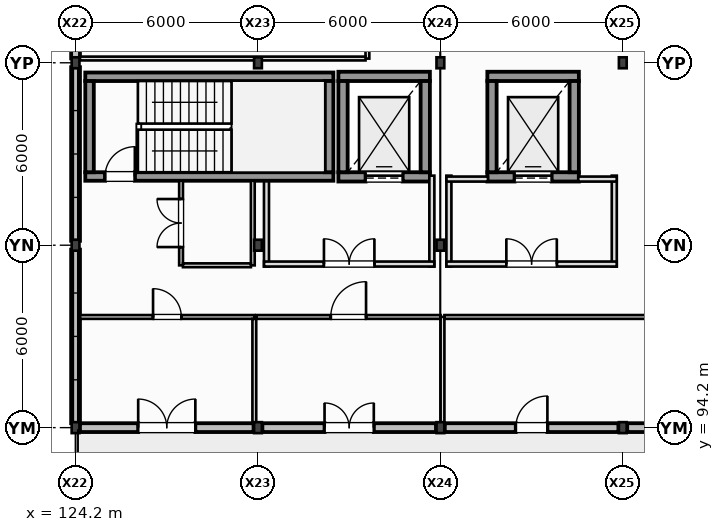
"""IFC4 building model, lengths in metres.
Left out: names, types, materials, properties, quantities, classifications, styles, units other than length and angle.
Written with IfcOpenShell. Run it as: python <this file> out.ifc"""

import sys

from ifc_helpers import new_model, si_unit, direction, frame, frame_2d, origin, origin_2d, place, context, subcontext, project, spatial, rectangle, i_section, extrude, element, fill, save


model = new_model("IFC4")
c1 = context("Model", 3, precision=1e-05, world=origin(), true_north=direction((0.0, 1.0)))
c2 = subcontext(c1, "Body", "Model", "MODEL_VIEW")
j1 = project(units=[si_unit("LENGTHUNIT", "METRE"), si_unit("PLANEANGLEUNIT", "RADIAN")], contexts=[c1])
p1 = place(None, origin())
s1 = spatial("IfcSite", under=j1, at=p1, CompositionType="ELEMENT")
p2 = place(p1, origin())
s2 = spatial("IfcBuilding", under=s1, at=p2, CompositionType="ELEMENT")
p3 = place(p2, frame((0.0, 0.0, 18.0)))
s3 = spatial("IfcBuildingStorey", under=s2, at=p3, CompositionType="ELEMENT", Elevation=18.0)
for number, where, z_axis, x_axis in (
    (1, (124.2, 94.2, 0.0), (0.0, 0.0, 1.0), (1.0, 0.0, 0.0)),
    (2, (124.2, 100.2, 0.0), (0.0, 0.0, 1.0), (1.0, 0.0, 0.0)),
    (3, (124.2, 106.2, 0.0), (0.0, 0.0, 1.0), (1.0, 0.0, 0.0)),
    (4, (130.2, 94.2, 0.0), (0.0, 0.0, 1.0), (1.0, 0.0, 0.0)),
    (5, (130.2, 100.2, 0.0), (0.0, 0.0, 1.0), (1.0, 0.0, 0.0)),
    (6, (130.2, 106.2, 0.0), (0.0, 0.0, 1.0), (1.0, 0.0, 0.0)),
    (7, (136.2, 94.2, 0.0), (0.0, 0.0, 1.0), (1.0, 0.0, 0.0)),
    (8, (136.2, 100.2, 0.0), (0.0, 0.0, 1.0), (1.0, 0.0, 0.0)),
    (9, (136.2, 106.2, 0.0), (0.0, 0.0, 1.0), (1.0, 0.0, 0.0)),
    (10, (142.2, 94.2, 0.0), (0.0, 0.0, 1.0), (1.0, 0.0, 0.0)),
    (11, (142.2, 106.2, 0.0), (0.0, 0.0, 1.0), (1.0, 0.0, 0.0)),
):
    element("IfcColumn", number, at=place(p3, frame(where, z_axis=z_axis, x_axis=x_axis)), inside=s3, PredefinedType="COLUMN", context=c2, shape_type="SweptSolid", body=[
        extrude(i_section(OverallWidth=0.256, OverallDepth=0.36, WebThickness=0.011, FlangeThickness=0.02, at=origin_2d()), origin(), (0.0, 0.0, 1.0), 3.6),
    ])
p4 = place(p3, frame((124.345, 94.2, 0.0), z_axis=(0.0, 0.0, 1.0), x_axis=(1.0, 0.0, 0.0)))
e12 = element("IfcWall", 12, at=p4, inside=s3, PredefinedType="STANDARD", context=c2, shape_type="SweptSolid", body=[
    extrude(rectangle(XDim=5.71, YDim=0.29, at=frame_2d((2.855, 0.0))), origin(), (0.0, 0.0, 1.0), 3.6),
])
p5 = place(p4, frame((1.915, 0.0, 0.0)))
e13 = element("IfcOpeningElement", 13, at=p5, cuts=e12, PredefinedType="OPENING", context=c2, shape_type="SweptSolid", body=[
    extrude(rectangle(XDim=1.88, YDim=2.28, at=frame_2d((0.94, 1.14))), frame((0.0, 0.155, 0.0), z_axis=(0.0, -1.0, 0.0), x_axis=(1.0, 0.0, 0.0)), (0.0, 0.0, 1.0), 0.31),
])
p6 = place(p3, frame((130.345, 94.2, 0.0), z_axis=(0.0, 0.0, 1.0), x_axis=(1.0, 0.0, 0.0)))
e14 = element("IfcWall", 14, at=p6, inside=s3, PredefinedType="STANDARD", context=c2, shape_type="SweptSolid", body=[
    extrude(rectangle(XDim=5.71, YDim=0.29, at=frame_2d((2.855, 0.0))), origin(), (0.0, 0.0, 1.0), 3.6),
])
p7 = place(p6, frame((2.045, 0.0, 0.0)))
e15 = element("IfcOpeningElement", 15, at=p7, cuts=e14, PredefinedType="OPENING", context=c2, shape_type="SweptSolid", body=[
    extrude(rectangle(XDim=1.62, YDim=2.2, at=frame_2d((0.81, 1.1))), frame((0.0, 0.155, 0.0), z_axis=(0.0, -1.0, 0.0), x_axis=(1.0, 0.0, 0.0)), (0.0, 0.0, 1.0), 0.31),
])
p8 = place(p3, frame((136.345, 94.2, 0.0), z_axis=(0.0, 0.0, 1.0), x_axis=(1.0, 0.0, 0.0)))
e16 = element("IfcWall", 16, at=p8, inside=s3, PredefinedType="STANDARD", context=c2, shape_type="SweptSolid", body=[
    extrude(rectangle(XDim=5.71, YDim=0.29, at=frame_2d((2.855, 0.0))), origin(), (0.0, 0.0, 1.0), 3.6),
])
p9 = place(p8, frame((2.335, 0.0, 0.0)))
e17 = element("IfcOpeningElement", 17, at=p9, cuts=e16, PredefinedType="OPENING", context=c2, shape_type="SweptSolid", body=[
    extrude(rectangle(XDim=1.04, YDim=2.16, at=frame_2d((0.52, 1.08))), frame((0.0, 0.155, 0.0), z_axis=(0.0, -1.0, 0.0), x_axis=(1.0, 0.0, 0.0)), (0.0, 0.0, 1.0), 0.31),
])
p10 = place(p3, frame((142.345, 94.2, 0.0), z_axis=(0.0, 0.0, 1.0), x_axis=(1.0, 0.0, 0.0)))
e18 = element("IfcWall", 18, at=p10, inside=s3, PredefinedType="STANDARD", context=c2, shape_type="SweptSolid", body=[
    extrude(rectangle(XDim=5.71, YDim=0.29, at=frame_2d((2.855, 0.0))), origin(), (0.0, 0.0, 1.0), 3.219),
])
p11 = place(p10, frame((2.375, 0.0, 0.0)))
e19 = element("IfcOpeningElement", 19, at=p11, cuts=e18, PredefinedType="OPENING", context=c2, shape_type="SweptSolid", body=[
    extrude(rectangle(XDim=0.96, YDim=2.14, at=frame_2d((0.48, 1.07))), frame((0.0, 0.155, 0.0), z_axis=(0.0, -1.0, 0.0), x_axis=(1.0, 0.0, 0.0)), (0.0, 0.0, 1.0), 0.31),
])
p12 = place(p3, frame((124.2, 100.055, 0.0), z_axis=(0.0, 0.0, 1.0), x_axis=(0.0, -1.0, 0.0)))
e20 = element("IfcWall", 20, at=p12, inside=s3, PredefinedType="STANDARD", context=c2, shape_type="SweptSolid", body=[
    extrude(rectangle(XDim=5.71, YDim=0.29, at=frame_2d((2.855, 0.0))), origin(), (0.0, 0.0, 1.0), 0.92),
])
p13 = place(p3, frame((124.2, 106.055, 0.0), z_axis=(0.0, 0.0, 1.0), x_axis=(0.0, -1.0, 0.0)))
e21 = element("IfcWall", 21, at=p13, inside=s3, PredefinedType="STANDARD", context=c2, shape_type="SweptSolid", body=[
    extrude(rectangle(XDim=5.71, YDim=0.29, at=frame_2d((2.855, 0.0))), origin(), (0.0, 0.0, 1.0), 0.32),
])
p14 = place(p3, frame((124.2, 112.055, 0.0), z_axis=(0.0, 0.0, 1.0), x_axis=(0.0, -1.0, 0.0)))
e22 = element("IfcWall", 22, at=p14, inside=s3, PredefinedType="STANDARD", context=c2, shape_type="SweptSolid", body=[
    extrude(rectangle(XDim=5.71, YDim=0.29, at=frame_2d((2.855, 0.0))), origin(), (0.0, 0.0, 1.0), 3.6),
])
p15 = place(p14, frame((1.83, 0.0, 0.85)))
e23 = element("IfcOpeningElement", 23, at=p15, cuts=e22, PredefinedType="OPENING", context=c2, shape_type="SweptSolid", body=[
    extrude(rectangle(XDim=2.05, YDim=1.75, at=frame_2d((1.025, 0.875))), frame((0.0, 0.155, 0.0), z_axis=(0.0, -1.0, 0.0), x_axis=(1.0, 0.0, 0.0)), (0.0, 0.0, 1.0), 0.31),
])
p16 = place(p3, frame((124.52, 102.46, 0.0), z_axis=(0.0, 0.0, 1.0), x_axis=(1.0, 0.0, 0.0)))
e24 = element("IfcWall", 24, at=p16, inside=s3, PredefinedType="SHEAR", context=c2, shape_type="SweptSolid", body=[
    extrude(rectangle(XDim=8.16, YDim=0.28, at=frame_2d((4.08, 0.0))), origin(), (0.0, 0.0, 1.0), 3.45),
])
p17 = place(p16, frame((0.65, 0.0, 0.0)))
e25 = element("IfcOpeningElement", 25, at=p17, cuts=e24, PredefinedType="OPENING", context=c2, shape_type="SweptSolid", body=[
    extrude(rectangle(XDim=0.98, YDim=2.15, at=frame_2d((0.49, 1.075))), frame((0.0, 0.15, 0.0), z_axis=(0.0, -1.0, 0.0), x_axis=(1.0, 0.0, 0.0)), (0.0, 0.0, 1.0), 0.3),
])
p18 = place(p3, frame((132.68, 105.74, 0.0), z_axis=(0.0, 0.0, 1.0), x_axis=(-1.0, 0.0, 0.0)))
e26 = element("IfcWall", 26, at=p18, inside=s3, PredefinedType="SHEAR", context=c2, shape_type="SweptSolid", body=[
    extrude(rectangle(XDim=8.16, YDim=0.28, at=frame_2d((4.08, 0.0))), origin(), (0.0, 0.0, 1.0), 3.45),
])
for number, where, z_axis, x_axis in (
    (27, (124.66, 105.6, 0.0), (0.0, 0.0, 1.0), (0.0, -1.0, 0.0)),
    (28, (132.54, 102.6, 0.0), (0.0, 0.0, 1.0), (0.0, 1.0, 0.0)),
):
    element("IfcWall", number, at=place(p3, frame(where, z_axis=z_axis, x_axis=x_axis)), inside=s3, PredefinedType="SHEAR", context=c2, shape_type="SweptSolid", body=[
        extrude(rectangle(XDim=3.0, YDim=0.28, at=frame_2d((1.5, 0.0))), origin(), (0.0, 0.0, 1.0), 3.45),
    ])
p19 = place(p3, frame((132.845, 102.448, 0.0), z_axis=(0.0, 0.0, 1.0), x_axis=(1.0, 0.0, 0.0)))
e29 = element("IfcWall", 29, at=p19, inside=s3, PredefinedType="SHEAR", context=c2, shape_type="SweptSolid", body=[
    extrude(rectangle(XDim=3.01, YDim=0.305, at=frame_2d((1.505, 0.0))), origin(), (0.0, 0.0, 1.0), 3.45),
])
p20 = place(p19, frame((0.895, 0.0, 0.0)))
e30 = element("IfcOpeningElement", 30, at=p20, cuts=e29, PredefinedType="OPENING", context=c2, shape_type="SweptSolid", body=[
    extrude(rectangle(XDim=1.22, YDim=2.22, at=frame_2d((0.61, 1.11))), frame((0.0, 0.162, 0.0), z_axis=(0.0, -1.0, 0.0), x_axis=(1.0, 0.0, 0.0)), (0.0, 0.0, 1.0), 0.325),
])
p21 = place(p3, frame((135.855, 105.752, 0.0), z_axis=(0.0, 0.0, 1.0), x_axis=(-1.0, 0.0, 0.0)))
e31 = element("IfcWall", 31, at=p21, inside=s3, PredefinedType="SHEAR", context=c2, shape_type="SweptSolid", body=[
    extrude(rectangle(XDim=3.01, YDim=0.305, at=frame_2d((1.505, 0.0))), origin(), (0.0, 0.0, 1.0), 3.45),
])
for number, where, z_axis, x_axis in (
    (32, (132.998, 105.6, 0.0), (0.0, 0.0, 1.0), (0.0, -1.0, 0.0)),
    (33, (135.702, 102.6, 0.0), (0.0, 0.0, 1.0), (0.0, 1.0, 0.0)),
):
    element("IfcWall", number, at=place(p3, frame(where, z_axis=z_axis, x_axis=x_axis)), inside=s3, PredefinedType="SHEAR", context=c2, shape_type="SweptSolid", body=[
        extrude(rectangle(XDim=3.0, YDim=0.305, at=frame_2d((1.5, 0.0))), origin(), (0.0, 0.0, 1.0), 3.45),
    ])
for number, where, z_axis, x_axis in (
    (34, (130.48, 99.5, 0.0), (0.0, 0.0, 1.0), (0.0, 1.0, 0.0)),
    (35, (135.92, 102.488, 0.0), (0.0, 0.0, 1.0), (0.0, -1.0, 0.0)),
):
    element("IfcWall", number, at=place(p3, frame(where, z_axis=z_axis, x_axis=x_axis)), inside=s3, PredefinedType="PARTITIONING", context=c2, shape_type="SweptSolid", body=[
        extrude(rectangle(XDim=2.988, YDim=0.165, at=frame_2d((1.494, 0.0))), origin(), (0.0, 0.0, 1.0), 3.36),
    ])
p22 = place(p3, frame((130.4, 99.58, 0.0), z_axis=(0.0, 0.0, 1.0), x_axis=(1.0, 0.0, 0.0)))
e36 = element("IfcWall", 36, at=p22, inside=s3, PredefinedType="PARTITIONING", context=c2, shape_type="SweptSolid", body=[
    extrude(rectangle(XDim=5.6, YDim=0.165, at=frame_2d((2.8, 0.0))), origin(), (0.0, 0.0, 1.0), 3.36),
])
p23 = place(p22, frame((1.97, 0.0, 0.0)))
e37 = element("IfcOpeningElement", 37, at=p23, cuts=e36, PredefinedType="OPENING", context=c2, shape_type="SweptSolid", body=[
    extrude(rectangle(XDim=1.66, YDim=2.2, at=frame_2d((0.83, 1.1))), frame((0.0, 0.093, 0.0), z_axis=(0.0, -1.0, 0.0), x_axis=(1.0, 0.0, 0.0)), (0.0, 0.0, 1.0), 0.185),
])
p24 = place(p3, frame((137.745, 102.448, 0.0), z_axis=(0.0, 0.0, 1.0), x_axis=(1.0, 0.0, 0.0)))
e38 = element("IfcWall", 38, at=p24, inside=s3, PredefinedType="SHEAR", context=c2, shape_type="SweptSolid", body=[
    extrude(rectangle(XDim=3.01, YDim=0.305, at=frame_2d((1.505, 0.0))), origin(), (0.0, 0.0, 1.0), 3.45),
])
p25 = place(p24, frame((0.895, 0.0, 0.0)))
e39 = element("IfcOpeningElement", 39, at=p25, cuts=e38, PredefinedType="OPENING", context=c2, shape_type="SweptSolid", body=[
    extrude(rectangle(XDim=1.22, YDim=2.22, at=frame_2d((0.61, 1.11))), frame((0.0, 0.162, 0.0), z_axis=(0.0, -1.0, 0.0), x_axis=(1.0, 0.0, 0.0)), (0.0, 0.0, 1.0), 0.325),
])
p26 = place(p3, frame((140.755, 105.752, 0.0), z_axis=(0.0, 0.0, 1.0), x_axis=(-1.0, 0.0, 0.0)))
e40 = element("IfcWall", 40, at=p26, inside=s3, PredefinedType="SHEAR", context=c2, shape_type="SweptSolid", body=[
    extrude(rectangle(XDim=3.01, YDim=0.305, at=frame_2d((1.505, 0.0))), origin(), (0.0, 0.0, 1.0), 3.45),
])
for number, where, z_axis, x_axis in (
    (41, (137.897, 105.6, 0.0), (0.0, 0.0, 1.0), (0.0, -1.0, 0.0)),
    (42, (140.603, 102.6, 0.0), (0.0, 0.0, 1.0), (0.0, 1.0, 0.0)),
):
    element("IfcWall", number, at=place(p3, frame(where, z_axis=z_axis, x_axis=x_axis)), inside=s3, PredefinedType="SHEAR", context=c2, shape_type="SweptSolid", body=[
        extrude(rectangle(XDim=3.0, YDim=0.305, at=frame_2d((1.5, 0.0))), origin(), (0.0, 0.0, 1.0), 3.45),
    ])
p27 = place(p3, frame((136.48, 99.5, 0.0), z_axis=(0.0, 0.0, 1.0), x_axis=(0.0, 1.0, 0.0)))
e43 = element("IfcWall", 43, at=p27, inside=s3, PredefinedType="PARTITIONING", context=c2, shape_type="SweptSolid", body=[
    extrude(rectangle(XDim=2.988, YDim=0.165, at=frame_2d((1.494, 0.0))), origin(), (0.0, 0.0, 1.0), 3.36),
])
p28 = place(p3, frame((141.92, 102.488, 0.0), z_axis=(0.0, 0.0, 1.0), x_axis=(0.0, -1.0, 0.0)))
e44 = element("IfcWall", 44, at=p28, inside=s3, PredefinedType="PARTITIONING", context=c2, shape_type="SweptSolid", body=[
    extrude(rectangle(XDim=2.988, YDim=0.165, at=frame_2d((1.494, 0.0))), origin(), (0.0, 0.0, 1.0), 3.246),
])
p29 = place(p3, frame((136.4, 102.375, 0.0), z_axis=(0.0, 0.0, 1.0), x_axis=(1.0, 0.0, 0.0)))
e45 = element("IfcWall", 45, at=p29, inside=s3, PredefinedType="PARTITIONING", context=c2, shape_type="SweptSolid", body=[
    extrude(rectangle(XDim=1.365, YDim=0.165, at=frame_2d((0.683, 0.0))), origin(), (0.0, 0.0, 1.0), 3.36),
])
p30 = place(p3, frame((140.735, 102.375, 0.0), z_axis=(0.0, 0.0, 1.0), x_axis=(1.0, 0.0, 0.0)))
e46 = element("IfcWall", 46, at=p30, inside=s3, PredefinedType="PARTITIONING", context=c2, shape_type="SweptSolid", body=[
    extrude(rectangle(XDim=1.265, YDim=0.165, at=frame_2d((0.632, 0.0))), origin(), (0.0, 0.0, 1.0), 3.36),
])
p31 = place(p3, frame((136.4, 99.58, 0.0), z_axis=(0.0, 0.0, 1.0), x_axis=(1.0, 0.0, 0.0)))
e47 = element("IfcWall", 47, at=p31, inside=s3, PredefinedType="PARTITIONING", context=c2, shape_type="SweptSolid", body=[
    extrude(rectangle(XDim=5.6, YDim=0.165, at=frame_2d((2.8, 0.0))), origin(), (0.0, 0.0, 1.0), 3.36),
])
p32 = place(p31, frame((1.97, 0.0, 0.0)))
e48 = element("IfcOpeningElement", 48, at=p32, cuts=e47, PredefinedType="OPENING", context=c2, shape_type="SweptSolid", body=[
    extrude(rectangle(XDim=1.66, YDim=2.2, at=frame_2d((0.83, 1.1))), frame((0.0, 0.093, 0.0), z_axis=(0.0, -1.0, 0.0), x_axis=(1.0, 0.0, 0.0)), (0.0, 0.0, 1.0), 0.185),
])
p33 = place(p3, frame((136.27, 94.345, 0.0), z_axis=(0.0, 0.0, 1.0), x_axis=(0.0, 1.0, 0.0)))
e49 = element("IfcWall", 49, at=p33, inside=s3, PredefinedType="PARTITIONING", context=c2, shape_type="SweptSolid", body=[
    extrude(rectangle(XDim=3.498, YDim=0.125, at=frame_2d((1.749, 0.0))), origin(), (0.0, 0.0, 1.0), 3.36),
])
p34 = place(p3, frame((136.333, 97.84, 0.0), z_axis=(0.0, 0.0, 1.0), x_axis=(1.0, 0.0, 0.0)))
e50 = element("IfcWall", 50, at=p34, inside=s3, PredefinedType="PARTITIONING", context=c2, shape_type="SweptSolid", body=[
    extrude(rectangle(XDim=17.722, YDim=0.125, at=frame_2d((8.861, 0.0))), origin(), (0.0, 0.0, 1.0), 3.36),
])
p35 = place(p34, frame((8.381, 0.0, 0.0)))
e51 = element("IfcOpeningElement", 51, at=p35, cuts=e50, PredefinedType="OPENING", context=c2, shape_type="SweptSolid", body=[
    extrude(rectangle(XDim=0.96, YDim=2.15, at=frame_2d((0.48, 1.075))), frame((0.0, 0.073, 0.0), z_axis=(0.0, -1.0, 0.0), x_axis=(1.0, 0.0, 0.0)), (0.0, 0.0, 1.0), 0.145),
])
p36 = place(p3, frame((124.345, 97.84, 0.0), z_axis=(0.0, 0.0, 1.0), x_axis=(1.0, 0.0, 0.0)))
e52 = element("IfcWall", 52, at=p36, inside=s3, PredefinedType="PARTITIONING", context=c2, shape_type="SweptSolid", body=[
    extrude(rectangle(XDim=5.738, YDim=0.125, at=frame_2d((2.869, 0.0))), origin(), (0.0, 0.0, 1.0), 3.36),
])
p37 = place(p36, frame((2.404, 0.0, 0.0)))
e53 = element("IfcOpeningElement", 53, at=p37, cuts=e52, PredefinedType="OPENING", context=c2, shape_type="SweptSolid", body=[
    extrude(rectangle(XDim=0.93, YDim=2.1, at=frame_2d((0.465, 1.05))), frame((0.0, 0.073, 0.0), z_axis=(0.0, -1.0, 0.0), x_axis=(1.0, 0.0, 0.0)), (0.0, 0.0, 1.0), 0.145),
])
p38 = place(p3, frame((130.08, 97.778, 0.0), z_axis=(0.0, 0.0, 1.0), x_axis=(0.0, -1.0, 0.0)))
e54 = element("IfcWall", 54, at=p38, inside=s3, PredefinedType="PARTITIONING", context=c2, shape_type="SweptSolid", body=[
    extrude(rectangle(XDim=3.433, YDim=0.125, at=frame_2d((1.716, 0.0))), origin(), (0.0, 0.0, 1.0), 3.36),
])
p39 = place(p3, frame((130.143, 97.84, 0.0), z_axis=(0.0, 0.0, 1.0), x_axis=(1.0, 0.0, 0.0)))
e55 = element("IfcWall", 55, at=p39, inside=s3, PredefinedType="PARTITIONING", context=c2, shape_type="SweptSolid", body=[
    extrude(rectangle(XDim=6.065, YDim=0.125, at=frame_2d((3.032, 0.0))), origin(), (0.0, 0.0, 1.0), 3.36),
])
p40 = place(p39, frame((2.452, 0.0, 0.0)))
e56 = element("IfcOpeningElement", 56, at=p40, cuts=e55, PredefinedType="OPENING", context=c2, shape_type="SweptSolid", body=[
    extrude(rectangle(XDim=1.16, YDim=2.2, at=frame_2d((0.58, 1.1))), frame((0.0, 0.073, 0.0), z_axis=(0.0, -1.0, 0.0), x_axis=(1.0, 0.0, 0.0)), (0.0, 0.0, 1.0), 0.145),
])
p41 = place(p3, frame((133.8, 108.403, 0.0), z_axis=(0.0, 0.0, 1.0), x_axis=(0.0, -1.0, 0.0)))
e57 = element("IfcWall", 57, at=p41, inside=s3, PredefinedType="PARTITIONING", context=c2, shape_type="SweptSolid", body=[
    extrude(rectangle(XDim=2.065, YDim=0.125, at=frame_2d((1.033, 0.0))), origin(), (0.0, 0.0, 1.0), 3.36),
])
p42 = place(p3, frame((133.738, 106.34, 0.0), z_axis=(0.0, 0.0, 1.0), x_axis=(-1.0, 0.0, 0.0)))
e58 = element("IfcWall", 58, at=p42, inside=s3, PredefinedType="PARTITIONING", context=c2, shape_type="SweptSolid", body=[
    extrude(rectangle(XDim=9.393, YDim=0.125, at=frame_2d((4.696, 0.0))), origin(), (0.0, 0.0, 1.0), 3.36),
])
p43 = place(p3, frame((127.67, 99.538, 0.0), z_axis=(0.0, 0.0, 1.0), x_axis=(0.0, 1.0, 0.0)))
e59 = element("IfcWall", 59, at=p43, inside=s3, PredefinedType="PARTITIONING", context=c2, shape_type="SweptSolid", body=[
    extrude(rectangle(XDim=2.782, YDim=0.125, at=frame_2d((1.391, 0.0))), origin(), (0.0, 0.0, 1.0), 3.36),
])
p44 = place(p43, frame((0.601, 0.0, 0.0)))
e60 = element("IfcOpeningElement", 60, at=p44, cuts=e59, PredefinedType="OPENING", context=c2, shape_type="SweptSolid", body=[
    extrude(rectangle(XDim=1.58, YDim=2.2, at=frame_2d((0.79, 1.1))), frame((0.0, 0.073, 0.0), z_axis=(0.0, -1.0, 0.0), x_axis=(1.0, 0.0, 0.0)), (0.0, 0.0, 1.0), 0.145),
])
p45 = place(p3, frame((130.03, 102.32, 0.0), z_axis=(0.0, 0.0, 1.0), x_axis=(0.0, -1.0, 0.0)))
e61 = element("IfcWall", 61, at=p45, inside=s3, PredefinedType="PARTITIONING", context=c2, shape_type="SweptSolid", body=[
    extrude(rectangle(XDim=2.782, YDim=0.125, at=frame_2d((1.391, 0.0))), origin(), (0.0, 0.0, 1.0), 3.36),
])
p46 = place(p3, frame((129.968, 99.54, 0.0), z_axis=(0.0, 0.0, 1.0), x_axis=(-1.0, 0.0, 0.0)))
e62 = element("IfcWall", 62, at=p46, inside=s3, PredefinedType="PARTITIONING", context=c2, shape_type="SweptSolid", body=[
    extrude(rectangle(XDim=2.235, YDim=0.125, at=frame_2d((1.118, 0.0))), origin(), (0.0, 0.0, 1.0), 3.36),
])
p47 = place(p5, frame((1.88, 0.0, 0.0), z_axis=(0.0, 0.0, 1.0), x_axis=(-1.0, 0.0, 0.0)))
e63 = element("IfcDoor", 63, at=p47, inside=s3, OperationType="DOUBLE_DOOR_SINGLE_SWING", PredefinedType="DOOR", context=c2, shape_type="SweptSolid", body=[
    extrude(rectangle(XDim=1.88, YDim=2.28, at=frame_2d((0.94, 1.14))), frame((0.0, 0.025, 0.0), z_axis=(0.0, -1.0, 0.0), x_axis=(1.0, 0.0, 0.0)), (0.0, 0.0, 1.0), 0.05),
])
fill(e13, e63)
p48 = place(p7, frame((1.62, 0.0, 0.0), z_axis=(0.0, 0.0, 1.0), x_axis=(-1.0, 0.0, 0.0)))
e64 = element("IfcDoor", 64, at=p48, inside=s3, OperationType="DOUBLE_DOOR_SINGLE_SWING", PredefinedType="DOOR", context=c2, shape_type="SweptSolid", body=[
    extrude(rectangle(XDim=1.62, YDim=2.2, at=frame_2d((0.81, 1.1))), frame((0.0, 0.025, 0.0), z_axis=(0.0, -1.0, 0.0), x_axis=(1.0, 0.0, 0.0)), (0.0, 0.0, 1.0), 0.05),
])
fill(e15, e64)
p49 = place(p9, frame((1.04, 0.0, 0.0), z_axis=(0.0, 0.0, 1.0), x_axis=(-1.0, 0.0, 0.0)))
e65 = element("IfcDoor", 65, at=p49, inside=s3, OperationType="SINGLE_SWING_RIGHT", PredefinedType="DOOR", context=c2, shape_type="SweptSolid", body=[
    extrude(rectangle(XDim=1.04, YDim=2.16, at=frame_2d((0.52, 1.08))), frame((0.0, 0.025, 0.0), z_axis=(0.0, -1.0, 0.0), x_axis=(1.0, 0.0, 0.0)), (0.0, 0.0, 1.0), 0.05),
])
fill(e17, e65)
p50 = place(p17, origin())
e66 = element("IfcDoor", 66, at=p50, inside=s3, OperationType="SINGLE_SWING_RIGHT", PredefinedType="DOOR", context=c2, shape_type="SweptSolid", body=[
    extrude(rectangle(XDim=0.98, YDim=2.15, at=frame_2d((0.49, 1.075))), frame((0.0, 0.025, 0.0), z_axis=(0.0, -1.0, 0.0), x_axis=(1.0, 0.0, 0.0)), (0.0, 0.0, 1.0), 0.05),
])
fill(e25, e66)
p51 = place(p20, origin())
e67 = element("IfcDoor", 67, at=p51, inside=s3, OperationType="SLIDING_TO_LEFT", PredefinedType="DOOR", context=c2, shape_type="SweptSolid", body=[
    extrude(rectangle(XDim=1.22, YDim=2.22, at=frame_2d((0.61, 1.11))), frame((0.0, 0.025, 0.0), z_axis=(0.0, -1.0, 0.0), x_axis=(1.0, 0.0, 0.0)), (0.0, 0.0, 1.0), 0.05),
])
fill(e30, e67)
p52 = place(p23, frame((1.66, 0.0, 0.0), z_axis=(0.0, 0.0, 1.0), x_axis=(-1.0, 0.0, 0.0)))
e68 = element("IfcDoor", 68, at=p52, inside=s3, OperationType="DOUBLE_DOOR_SINGLE_SWING", PredefinedType="DOOR", context=c2, shape_type="SweptSolid", body=[
    extrude(rectangle(XDim=1.66, YDim=2.2, at=frame_2d((0.83, 1.1))), frame((0.0, 0.025, 0.0), z_axis=(0.0, -1.0, 0.0), x_axis=(1.0, 0.0, 0.0)), (0.0, 0.0, 1.0), 0.05),
])
fill(e37, e68)
p53 = place(p25, origin())
e69 = element("IfcDoor", 69, at=p53, inside=s3, OperationType="SLIDING_TO_LEFT", PredefinedType="DOOR", context=c2, shape_type="SweptSolid", body=[
    extrude(rectangle(XDim=1.22, YDim=2.22, at=frame_2d((0.61, 1.11))), frame((0.0, 0.025, 0.0), z_axis=(0.0, -1.0, 0.0), x_axis=(1.0, 0.0, 0.0)), (0.0, 0.0, 1.0), 0.05),
])
fill(e39, e69)
p54 = place(p32, frame((1.66, 0.0, 0.0), z_axis=(0.0, 0.0, 1.0), x_axis=(-1.0, 0.0, 0.0)))
e70 = element("IfcDoor", 70, at=p54, inside=s3, OperationType="DOUBLE_DOOR_SINGLE_SWING", PredefinedType="DOOR", context=c2, shape_type="SweptSolid", body=[
    extrude(rectangle(XDim=1.66, YDim=2.2, at=frame_2d((0.83, 1.1))), frame((0.0, 0.025, 0.0), z_axis=(0.0, -1.0, 0.0), x_axis=(1.0, 0.0, 0.0)), (0.0, 0.0, 1.0), 0.05),
])
fill(e48, e70)
p55 = place(p37, frame((0.93, 0.0, 0.0), z_axis=(0.0, 0.0, 1.0), x_axis=(-1.0, 0.0, 0.0)))
e71 = element("IfcDoor", 71, at=p55, inside=s3, OperationType="SINGLE_SWING_LEFT", PredefinedType="DOOR", context=c2, shape_type="SweptSolid", body=[
    extrude(rectangle(XDim=0.93, YDim=2.1, at=frame_2d((0.465, 1.05))), frame((0.0, 0.025, 0.0), z_axis=(0.0, -1.0, 0.0), x_axis=(1.0, 0.0, 0.0)), (0.0, 0.0, 1.0), 0.05),
])
fill(e53, e71)
p56 = place(p40, frame((1.16, 0.0, 0.0), z_axis=(0.0, 0.0, 1.0), x_axis=(-1.0, 0.0, 0.0)))
e72 = element("IfcDoor", 72, at=p56, inside=s3, OperationType="SINGLE_SWING_RIGHT", PredefinedType="DOOR", context=c2, shape_type="SweptSolid", body=[
    extrude(rectangle(XDim=1.16, YDim=2.2, at=frame_2d((0.58, 1.1))), frame((0.0, 0.025, 0.0), z_axis=(0.0, -1.0, 0.0), x_axis=(1.0, 0.0, 0.0)), (0.0, 0.0, 1.0), 0.05),
])
fill(e56, e72)
p57 = place(p44, frame((1.58, 0.0, 0.0), z_axis=(0.0, 0.0, 1.0), x_axis=(-1.0, 0.0, 0.0)))
e73 = element("IfcDoor", 73, at=p57, inside=s3, OperationType="DOUBLE_DOOR_SINGLE_SWING", PredefinedType="DOOR", context=c2, shape_type="SweptSolid", body=[
    extrude(rectangle(XDim=1.58, YDim=2.2, at=frame_2d((0.79, 1.1))), frame((0.0, 0.025, 0.0), z_axis=(0.0, -1.0, 0.0), x_axis=(1.0, 0.0, 0.0)), (0.0, 0.0, 1.0), 0.05),
])
fill(e60, e73)
save(model, sys.argv[1])
